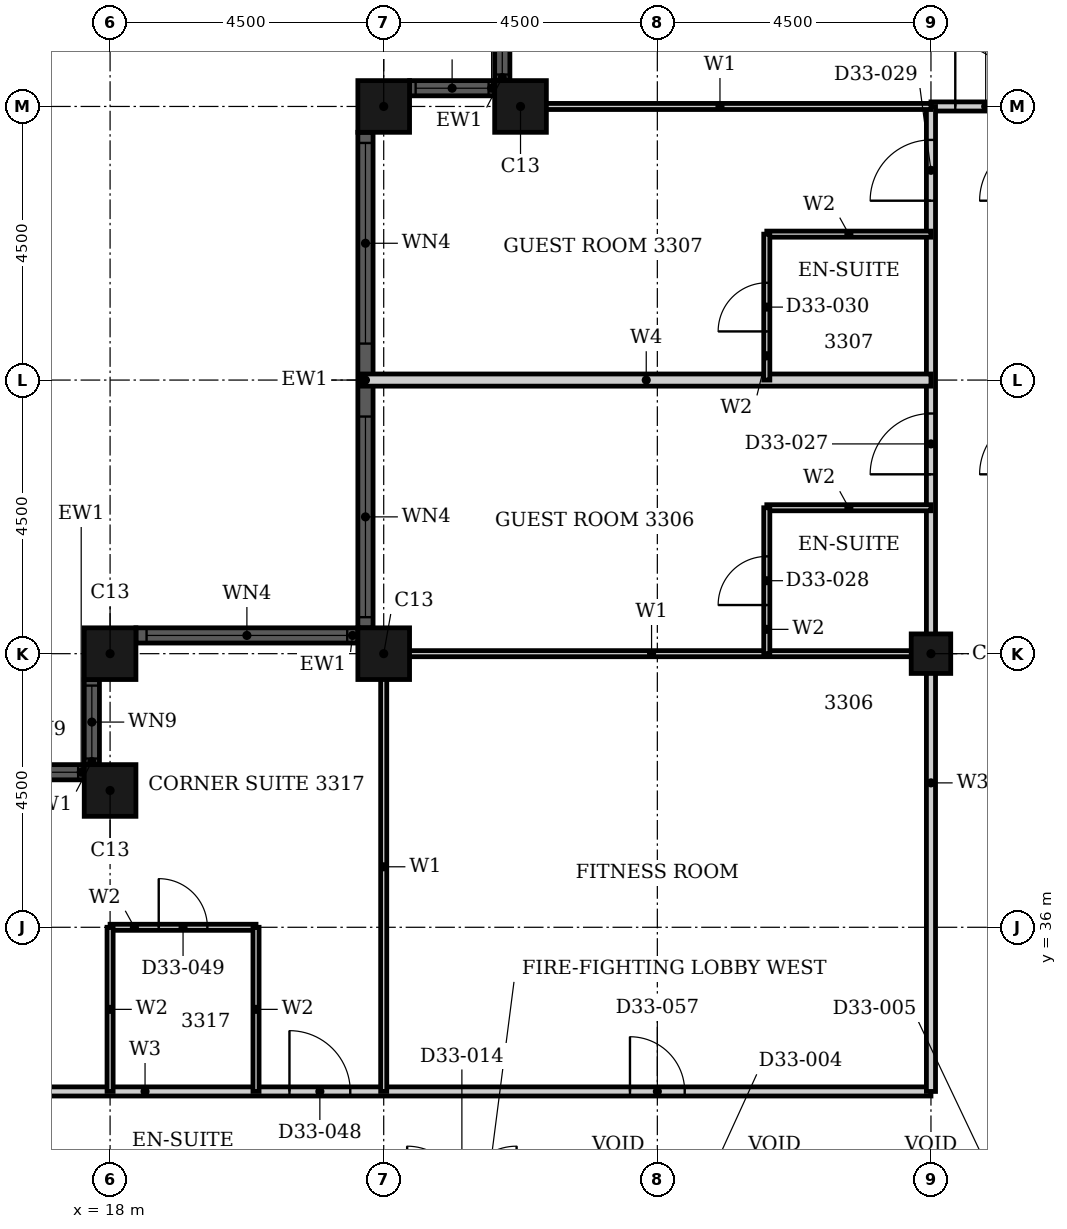
"""IFC4 building model, lengths in metres.
Left out: names, types, materials, properties, quantities, classifications, styles, units other than length and angle.
Written with IfcOpenShell. Run it as: python <this file> out.ifc"""

import sys

from ifc_helpers import new_model, si_unit, direction, frame, frame_2d, origin, origin_2d, place, context, subcontext, project, spatial, rectangle, hollow_rectangle, extrude, element, fill, save


model = new_model("IFC4")
c1 = context("Model", 3, precision=1e-05, world=origin(), true_north=direction((0.0, 1.0)))
c2 = subcontext(c1, "Body", "Model", "MODEL_VIEW")
j1 = project(units=[si_unit("LENGTHUNIT", "METRE"), si_unit("PLANEANGLEUNIT", "RADIAN")], contexts=[c1])
p1 = place(None, origin())
s1 = spatial("IfcSite", under=j1, at=p1, CompositionType="ELEMENT")
p2 = place(p1, origin())
s2 = spatial("IfcBuilding", under=s1, at=p2, CompositionType="ELEMENT")
p3 = place(p2, frame((0.0, 0.0, 133.2)))
s3 = spatial("IfcBuildingStorey", under=s2, at=p3, CompositionType="ELEMENT", Elevation=133.2)
for number, where, z_axis, x_axis in (
    (1, (24.75, 49.5, 0.0), (0.0, 0.0, 1.0), (1.0, 0.0, 0.0)),
    (2, (22.5, 49.5, 0.0), (0.0, 0.0, 1.0), (1.0, 0.0, 0.0)),
    (3, (22.5, 40.5, 0.0), (0.0, 0.0, 1.0), (1.0, 0.0, 0.0)),
    (4, (18.0, 40.5, 0.0), (0.0, 0.0, 1.0), (1.0, 0.0, 0.0)),
    (5, (18.0, 38.25, 0.0), (0.0, 0.0, 1.0), (1.0, 0.0, 0.0)),
):
    element("IfcColumn", number, at=place(p3, frame(where, z_axis=z_axis, x_axis=x_axis)), inside=s3, PredefinedType="COLUMN", context=c2, shape_type="SweptSolid", body=[
        extrude(hollow_rectangle(XDim=0.85, YDim=0.85, WallThickness=0.026, at=origin_2d()), origin(), (0.0, 0.0, 1.0), 3.6),
    ])
p4 = place(p3, frame((31.5, 40.5, 0.0), z_axis=(0.0, 0.0, 1.0), x_axis=(1.0, 0.0, 0.0)))
e6 = element("IfcColumn", 6, at=p4, inside=s3, PredefinedType="COLUMN", context=c2, shape_type="SweptSolid", body=[
    extrude(hollow_rectangle(XDim=0.65, YDim=0.65, WallThickness=0.021, at=origin_2d()), origin(), (0.0, 0.0, 1.0), 3.6),
])
p5 = place(p3, frame((24.45, 51.325, 0.0), z_axis=(0.0, 0.0, 1.0), x_axis=(0.0, -1.0, 0.0)))
e7 = element("IfcWall", 7, at=p5, inside=s3, PredefinedType="SOLIDWALL", context=c2, shape_type="SweptSolid", body=[
    extrude(rectangle(XDim=1.4, YDim=0.25, at=frame_2d((0.7, 0.0))), origin(), (0.0, 0.0, 1.0), 3.6),
])
p6 = place(p5, frame((0.1, 0.0, 0.9)))
e8 = element("IfcOpeningElement", 8, at=p6, cuts=e7, PredefinedType="OPENING", context=c2, shape_type="SweptSolid", body=[
    extrude(rectangle(XDim=1.2, YDim=2.08, at=frame_2d((0.6, 1.04))), frame((0.0, 0.135, 0.0), z_axis=(0.0, -1.0, 0.0), x_axis=(1.0, 0.0, 0.0)), (0.0, 0.0, 1.0), 0.27),
])
p7 = place(p3, frame((24.325, 49.8, 0.0), z_axis=(0.0, 0.0, 1.0), x_axis=(-1.0, 0.0, 0.0)))
e9 = element("IfcWall", 9, at=p7, inside=s3, PredefinedType="SOLIDWALL", context=c2, shape_type="SweptSolid", body=[
    extrude(rectangle(XDim=1.4, YDim=0.25, at=frame_2d((0.7, 0.0))), origin(), (0.0, 0.0, 1.0), 3.6),
])
p8 = place(p7, frame((0.1, 0.0, 0.9)))
e10 = element("IfcOpeningElement", 10, at=p8, cuts=e9, PredefinedType="OPENING", context=c2, shape_type="SweptSolid", body=[
    extrude(rectangle(XDim=1.2, YDim=2.08, at=frame_2d((0.6, 1.04))), frame((0.0, 0.135, 0.0), z_axis=(0.0, -1.0, 0.0), x_axis=(1.0, 0.0, 0.0)), (0.0, 0.0, 1.0), 0.27),
])
p9 = place(p3, frame((22.2, 49.075, 0.0), z_axis=(0.0, 0.0, 1.0), x_axis=(0.0, -1.0, 0.0)))
e11 = element("IfcWall", 11, at=p9, inside=s3, PredefinedType="SOLIDWALL", context=c2, shape_type="SweptSolid", body=[
    extrude(rectangle(XDim=8.15, YDim=0.25, at=frame_2d((4.075, 0.0))), origin(), (0.0, 0.0, 1.0), 3.6),
])
p10 = place(p9, frame((0.175, 0.0, 0.9)))
e12 = element("IfcOpeningElement", 12, at=p10, cuts=e11, PredefinedType="OPENING", context=c2, shape_type="SweptSolid", body=[
    extrude(rectangle(XDim=3.3, YDim=2.08, at=frame_2d((1.65, 1.04))), frame((0.0, 0.135, 0.0), z_axis=(0.0, -1.0, 0.0), x_axis=(1.0, 0.0, 0.0)), (0.0, 0.0, 1.0), 0.27),
])
p11 = place(p9, frame((4.675, 0.0, 0.9)))
e13 = element("IfcOpeningElement", 13, at=p11, cuts=e11, PredefinedType="OPENING", context=c2, shape_type="SweptSolid", body=[
    extrude(rectangle(XDim=3.3, YDim=2.08, at=frame_2d((1.65, 1.04))), frame((0.0, 0.135, 0.0), z_axis=(0.0, -1.0, 0.0), x_axis=(1.0, 0.0, 0.0)), (0.0, 0.0, 1.0), 0.27),
])
p12 = place(p3, frame((22.075, 40.8, 0.0), z_axis=(0.0, 0.0, 1.0), x_axis=(-1.0, 0.0, 0.0)))
e14 = element("IfcWall", 14, at=p12, inside=s3, PredefinedType="SOLIDWALL", context=c2, shape_type="SweptSolid", body=[
    extrude(rectangle(XDim=3.65, YDim=0.25, at=frame_2d((1.825, 0.0))), origin(), (0.0, 0.0, 1.0), 3.6),
])
p13 = place(p12, frame((0.175, 0.0, 0.9)))
e15 = element("IfcOpeningElement", 15, at=p13, cuts=e14, PredefinedType="OPENING", context=c2, shape_type="SweptSolid", body=[
    extrude(rectangle(XDim=3.3, YDim=2.08, at=frame_2d((1.65, 1.04))), frame((0.0, 0.135, 0.0), z_axis=(0.0, -1.0, 0.0), x_axis=(1.0, 0.0, 0.0)), (0.0, 0.0, 1.0), 0.27),
])
p14 = place(p3, frame((17.7, 40.075, 0.0), z_axis=(0.0, 0.0, 1.0), x_axis=(0.0, -1.0, 0.0)))
e16 = element("IfcWall", 16, at=p14, inside=s3, PredefinedType="SOLIDWALL", context=c2, shape_type="SweptSolid", body=[
    extrude(rectangle(XDim=1.4, YDim=0.25, at=frame_2d((0.7, 0.0))), origin(), (0.0, 0.0, 1.0), 3.6),
])
p15 = place(p14, frame((0.1, 0.0, 0.9)))
e17 = element("IfcOpeningElement", 17, at=p15, cuts=e16, PredefinedType="OPENING", context=c2, shape_type="SweptSolid", body=[
    extrude(rectangle(XDim=1.2, YDim=2.08, at=frame_2d((0.6, 1.04))), frame((0.0, 0.135, 0.0), z_axis=(0.0, -1.0, 0.0), x_axis=(1.0, 0.0, 0.0)), (0.0, 0.0, 1.0), 0.27),
])
p16 = place(p3, frame((17.575, 38.55, 0.0), z_axis=(0.0, 0.0, 1.0), x_axis=(-1.0, 0.0, 0.0)))
e18 = element("IfcWall", 18, at=p16, inside=s3, PredefinedType="SOLIDWALL", context=c2, shape_type="SweptSolid", body=[
    extrude(rectangle(XDim=1.4, YDim=0.25, at=frame_2d((0.7, 0.0))), origin(), (0.0, 0.0, 1.0), 3.6),
])
p17 = place(p16, frame((0.1, 0.0, 0.9)))
e19 = element("IfcOpeningElement", 19, at=p17, cuts=e18, PredefinedType="OPENING", context=c2, shape_type="SweptSolid", body=[
    extrude(rectangle(XDim=1.2, YDim=2.08, at=frame_2d((0.6, 1.04))), frame((0.0, 0.135, 0.0), z_axis=(0.0, -1.0, 0.0), x_axis=(1.0, 0.0, 0.0)), (0.0, 0.0, 1.0), 0.27),
])
p18 = place(p3, frame((16.2, 33.3, 0.0), z_axis=(0.0, 0.0, 1.0), x_axis=(1.0, 0.0, 0.0)))
e20 = element("IfcWall", 20, at=p18, inside=s3, PredefinedType="PARTITIONING", context=c2, shape_type="SweptSolid", body=[
    extrude(rectangle(XDim=15.3, YDim=0.15, at=frame_2d((7.65, 0.0))), origin(), (0.0, 0.0, 1.0), 3.3),
])
p19 = place(p18, frame((4.75, 0.0, 0.0)))
e21 = element("IfcOpeningElement", 21, at=p19, cuts=e20, PredefinedType="OPENING", context=c2, shape_type="SweptSolid", body=[
    extrude(rectangle(XDim=1.0, YDim=2.1, at=frame_2d((0.5, 1.05))), frame((0.0, 0.085, 0.0), z_axis=(0.0, -1.0, 0.0), x_axis=(1.0, 0.0, 0.0)), (0.0, 0.0, 1.0), 0.17),
])
p20 = place(p18, frame((10.35, 0.0, 0.0)))
e22 = element("IfcOpeningElement", 22, at=p20, cuts=e20, PredefinedType="OPENING", context=c2, shape_type="SweptSolid", body=[
    extrude(rectangle(XDim=0.9, YDim=2.1, at=frame_2d((0.45, 1.05))), frame((0.0, 0.085, 0.0), z_axis=(0.0, -1.0, 0.0), x_axis=(1.0, 0.0, 0.0)), (0.0, 0.0, 1.0), 0.17),
])
p21 = place(p3, frame((31.5, 49.5, 0.0), z_axis=(0.0, 0.0, 1.0), x_axis=(1.0, 0.0, 0.0)))
e23 = element("IfcWall", 23, at=p21, inside=s3, PredefinedType="PARTITIONING", context=c2, shape_type="SweptSolid", body=[
    extrude(rectangle(XDim=1.8, YDim=0.15, at=frame_2d((0.9, 0.0))), origin(), (0.0, 0.0, 1.0), 3.3),
])
p22 = place(p21, frame((0.4, 0.0, 0.0)))
e24 = element("IfcOpeningElement", 24, at=p22, cuts=e23, PredefinedType="OPENING", context=c2, shape_type="SweptSolid", body=[
    extrude(rectangle(XDim=1.0, YDim=2.1, at=frame_2d((0.5, 1.05))), frame((0.0, 0.085, 0.0), z_axis=(0.0, -1.0, 0.0), x_axis=(1.0, 0.0, 0.0)), (0.0, 0.0, 1.0), 0.17),
])
p23 = place(p3, frame((31.5, 33.3, 0.0), z_axis=(0.0, 0.0, 1.0), x_axis=(0.0, 1.0, 0.0)))
e25 = element("IfcWall", 25, at=p23, inside=s3, PredefinedType="PARTITIONING", context=c2, shape_type="SweptSolid", body=[
    extrude(rectangle(XDim=16.2, YDim=0.15, at=frame_2d((8.1, 0.0))), origin(), (0.0, 0.0, 1.0), 2.58),
])
p24 = place(p23, frame((10.15, 0.0, 0.0)))
e26 = element("IfcOpeningElement", 26, at=p24, cuts=e25, PredefinedType="OPENING", context=c2, shape_type="SweptSolid", body=[
    extrude(rectangle(XDim=1.0, YDim=2.1, at=frame_2d((0.5, 1.05))), frame((0.0, 0.085, 0.0), z_axis=(0.0, -1.0, 0.0), x_axis=(1.0, 0.0, 0.0)), (0.0, 0.0, 1.0), 0.17),
])
p25 = place(p23, frame((14.65, 0.0, 0.0)))
e27 = element("IfcOpeningElement", 27, at=p25, cuts=e25, PredefinedType="OPENING", context=c2, shape_type="SweptSolid", body=[
    extrude(rectangle(XDim=1.0, YDim=2.1, at=frame_2d((0.5, 1.05))), frame((0.0, 0.085, 0.0), z_axis=(0.0, -1.0, 0.0), x_axis=(1.0, 0.0, 0.0)), (0.0, 0.0, 1.0), 0.17),
])
p26 = place(p3, frame((22.31, 40.5, 0.0), z_axis=(0.0, 0.0, 1.0), x_axis=(1.0, 0.0, 0.0)))
e28 = element("IfcWall", 28, at=p26, inside=s3, PredefinedType="PARTITIONING", context=c2, shape_type="SweptSolid", body=[
    extrude(rectangle(XDim=9.19, YDim=0.1, at=frame_2d((4.595, 0.0))), origin(), (0.0, 0.0, 1.0), 2.38),
])
p27 = place(p3, frame((24.56, 49.5, 0.0), z_axis=(0.0, 0.0, 1.0), x_axis=(1.0, 0.0, 0.0)))
e29 = element("IfcWall", 29, at=p27, inside=s3, PredefinedType="PARTITIONING", context=c2, shape_type="SweptSolid", body=[
    extrude(rectangle(XDim=6.94, YDim=0.1, at=frame_2d((3.47, 0.0))), origin(), (0.0, 0.0, 1.0), 3.3),
])
p28 = place(p3, frame((22.5, 33.3, 0.0), z_axis=(0.0, 0.0, 1.0), x_axis=(0.0, 1.0, 0.0)))
e30 = element("IfcWall", 30, at=p28, inside=s3, PredefinedType="PARTITIONING", context=c2, shape_type="SweptSolid", body=[
    extrude(rectangle(XDim=7.39, YDim=0.1, at=frame_2d((3.695, 0.0))), origin(), (0.0, 0.0, 1.0), 3.3),
])
p29 = place(p3, frame((22.135, 45.0, 0.0), z_axis=(0.0, 0.0, 1.0), x_axis=(1.0, 0.0, 0.0)))
e31 = element("IfcWall", 31, at=p29, inside=s3, PredefinedType="PARTITIONING", context=c2, shape_type="SweptSolid", body=[
    extrude(rectangle(XDim=9.365, YDim=0.2, at=frame_2d((4.683, 0.0))), origin(), (0.0, 0.0, 1.0), 3.3),
])
p30 = place(p3, frame((18.0, 36.0, 0.0), z_axis=(0.0, 0.0, 1.0), x_axis=(1.0, 0.0, 0.0)))
e32 = element("IfcWall", 32, at=p30, inside=s3, PredefinedType="PARTITIONING", context=c2, shape_type="SweptSolid", body=[
    extrude(rectangle(XDim=2.4, YDim=0.1, at=frame_2d((1.2, 0.0))), origin(), (0.0, 0.0, 1.0), 3.3),
])
p31 = place(p30, frame((0.8, 0.0, 0.0)))
e33 = element("IfcOpeningElement", 33, at=p31, cuts=e32, PredefinedType="OPENING", context=c2, shape_type="SweptSolid", body=[
    extrude(rectangle(XDim=0.8, YDim=2.1, at=frame_2d((0.4, 1.05))), frame((0.0, 0.06, 0.0), z_axis=(0.0, -1.0, 0.0), x_axis=(1.0, 0.0, 0.0)), (0.0, 0.0, 1.0), 0.12),
])
for number, where, z_axis, x_axis in (
    (34, (28.8, 42.9, 0.0), (0.0, 0.0, 1.0), (1.0, 0.0, 0.0)),
    (35, (28.8, 47.4, 0.0), (0.0, 0.0, 1.0), (1.0, 0.0, 0.0)),
    (36, (18.0, 33.3, 0.0), (0.0, 0.0, 1.0), (0.0, 1.0, 0.0)),
    (37, (20.4, 33.3, 0.0), (0.0, 0.0, 1.0), (0.0, 1.0, 0.0)),
):
    element("IfcWall", number, at=place(p3, frame(where, z_axis=z_axis, x_axis=x_axis)), inside=s3, PredefinedType="PARTITIONING", context=c2, shape_type="SweptSolid", body=[
        extrude(rectangle(XDim=2.7, YDim=0.1, at=frame_2d((1.35, 0.0))), origin(), (0.0, 0.0, 1.0), 3.3),
    ])
p32 = place(p3, frame((28.8, 40.5, 0.0), z_axis=(0.0, 0.0, 1.0), x_axis=(0.0, 1.0, 0.0)))
e38 = element("IfcWall", 38, at=p32, inside=s3, PredefinedType="PARTITIONING", context=c2, shape_type="SweptSolid", body=[
    extrude(rectangle(XDim=2.4, YDim=0.1, at=frame_2d((1.2, 0.0))), origin(), (0.0, 0.0, 1.0), 3.3),
])
p33 = place(p32, frame((0.8, 0.0, 0.0)))
e39 = element("IfcOpeningElement", 39, at=p33, cuts=e38, PredefinedType="OPENING", context=c2, shape_type="SweptSolid", body=[
    extrude(rectangle(XDim=0.8, YDim=2.1, at=frame_2d((0.4, 1.05))), frame((0.0, 0.06, 0.0), z_axis=(0.0, -1.0, 0.0), x_axis=(1.0, 0.0, 0.0)), (0.0, 0.0, 1.0), 0.12),
])
p34 = place(p3, frame((28.8, 45.0, 0.0), z_axis=(0.0, 0.0, 1.0), x_axis=(0.0, 1.0, 0.0)))
e40 = element("IfcWall", 40, at=p34, inside=s3, PredefinedType="PARTITIONING", context=c2, shape_type="SweptSolid", body=[
    extrude(rectangle(XDim=2.4, YDim=0.1, at=frame_2d((1.2, 0.0))), origin(), (0.0, 0.0, 1.0), 3.3),
])
p35 = place(p34, frame((0.8, 0.0, 0.0)))
e41 = element("IfcOpeningElement", 41, at=p35, cuts=e40, PredefinedType="OPENING", context=c2, shape_type="SweptSolid", body=[
    extrude(rectangle(XDim=0.8, YDim=2.1, at=frame_2d((0.4, 1.05))), frame((0.0, 0.06, 0.0), z_axis=(0.0, -1.0, 0.0), x_axis=(1.0, 0.0, 0.0)), (0.0, 0.0, 1.0), 0.12),
])
p36 = place(p6, origin())
e42 = element("IfcWindow", 42, at=p36, inside=s3, PartitioningType="SINGLE_PANEL", PredefinedType="WINDOW", context=c2, shape_type="SweptSolid", body=[
    extrude(rectangle(XDim=1.2, YDim=2.08, at=frame_2d((0.6, 1.04))), frame((0.0, 0.03, 0.0), z_axis=(0.0, -1.0, 0.0), x_axis=(1.0, 0.0, 0.0)), (0.0, 0.0, 1.0), 0.06),
])
fill(e8, e42)
p37 = place(p8, origin())
e43 = element("IfcWindow", 43, at=p37, inside=s3, PartitioningType="SINGLE_PANEL", PredefinedType="WINDOW", context=c2, shape_type="SweptSolid", body=[
    extrude(rectangle(XDim=1.2, YDim=2.08, at=frame_2d((0.6, 1.04))), frame((0.0, 0.03, 0.0), z_axis=(0.0, -1.0, 0.0), x_axis=(1.0, 0.0, 0.0)), (0.0, 0.0, 1.0), 0.06),
])
fill(e10, e43)
p38 = place(p10, origin())
e44 = element("IfcWindow", 44, at=p38, inside=s3, PartitioningType="SINGLE_PANEL", PredefinedType="WINDOW", context=c2, shape_type="SweptSolid", body=[
    extrude(rectangle(XDim=3.3, YDim=2.08, at=frame_2d((1.65, 1.04))), frame((0.0, 0.03, 0.0), z_axis=(0.0, -1.0, 0.0), x_axis=(1.0, 0.0, 0.0)), (0.0, 0.0, 1.0), 0.06),
])
fill(e12, e44)
p39 = place(p11, origin())
e45 = element("IfcWindow", 45, at=p39, inside=s3, PartitioningType="SINGLE_PANEL", PredefinedType="WINDOW", context=c2, shape_type="SweptSolid", body=[
    extrude(rectangle(XDim=3.3, YDim=2.08, at=frame_2d((1.65, 1.04))), frame((0.0, 0.03, 0.0), z_axis=(0.0, -1.0, 0.0), x_axis=(1.0, 0.0, 0.0)), (0.0, 0.0, 1.0), 0.06),
])
fill(e13, e45)
p40 = place(p13, origin())
e46 = element("IfcWindow", 46, at=p40, inside=s3, PartitioningType="SINGLE_PANEL", PredefinedType="WINDOW", context=c2, shape_type="SweptSolid", body=[
    extrude(rectangle(XDim=3.3, YDim=2.08, at=frame_2d((1.65, 1.04))), frame((0.0, 0.03, 0.0), z_axis=(0.0, -1.0, 0.0), x_axis=(1.0, 0.0, 0.0)), (0.0, 0.0, 1.0), 0.06),
])
fill(e15, e46)
p41 = place(p15, origin())
e47 = element("IfcWindow", 47, at=p41, inside=s3, PartitioningType="SINGLE_PANEL", PredefinedType="WINDOW", context=c2, shape_type="SweptSolid", body=[
    extrude(rectangle(XDim=1.2, YDim=2.08, at=frame_2d((0.6, 1.04))), frame((0.0, 0.03, 0.0), z_axis=(0.0, -1.0, 0.0), x_axis=(1.0, 0.0, 0.0)), (0.0, 0.0, 1.0), 0.06),
])
fill(e17, e47)
p42 = place(p17, origin())
e48 = element("IfcWindow", 48, at=p42, inside=s3, PartitioningType="SINGLE_PANEL", PredefinedType="WINDOW", context=c2, shape_type="SweptSolid", body=[
    extrude(rectangle(XDim=1.2, YDim=2.08, at=frame_2d((0.6, 1.04))), frame((0.0, 0.03, 0.0), z_axis=(0.0, -1.0, 0.0), x_axis=(1.0, 0.0, 0.0)), (0.0, 0.0, 1.0), 0.06),
])
fill(e19, e48)
p43 = place(p24, origin())
e49 = element("IfcDoor", 49, at=p43, inside=s3, OperationType="SINGLE_SWING_RIGHT", PredefinedType="DOOR", context=c2, shape_type="SweptSolid", body=[
    extrude(rectangle(XDim=1.0, YDim=2.1, at=frame_2d((0.5, 1.05))), frame((0.0, 0.025, 0.0), z_axis=(0.0, -1.0, 0.0), x_axis=(1.0, 0.0, 0.0)), (0.0, 0.0, 1.0), 0.05),
])
fill(e26, e49)
p44 = place(p33, origin())
e50 = element("IfcDoor", 50, at=p44, inside=s3, OperationType="SINGLE_SWING_RIGHT", PredefinedType="DOOR", context=c2, shape_type="SweptSolid", body=[
    extrude(rectangle(XDim=0.8, YDim=2.1, at=frame_2d((0.4, 1.05))), frame((0.0, 0.025, 0.0), z_axis=(0.0, -1.0, 0.0), x_axis=(1.0, 0.0, 0.0)), (0.0, 0.0, 1.0), 0.05),
])
fill(e39, e50)
p45 = place(p25, origin())
e51 = element("IfcDoor", 51, at=p45, inside=s3, OperationType="SINGLE_SWING_RIGHT", PredefinedType="DOOR", context=c2, shape_type="SweptSolid", body=[
    extrude(rectangle(XDim=1.0, YDim=2.1, at=frame_2d((0.5, 1.05))), frame((0.0, 0.025, 0.0), z_axis=(0.0, -1.0, 0.0), x_axis=(1.0, 0.0, 0.0)), (0.0, 0.0, 1.0), 0.05),
])
fill(e27, e51)
p46 = place(p35, origin())
e52 = element("IfcDoor", 52, at=p46, inside=s3, OperationType="SINGLE_SWING_RIGHT", PredefinedType="DOOR", context=c2, shape_type="SweptSolid", body=[
    extrude(rectangle(XDim=0.8, YDim=2.1, at=frame_2d((0.4, 1.05))), frame((0.0, 0.025, 0.0), z_axis=(0.0, -1.0, 0.0), x_axis=(1.0, 0.0, 0.0)), (0.0, 0.0, 1.0), 0.05),
])
fill(e41, e52)
p47 = place(p22, origin())
e53 = element("IfcDoor", 53, at=p47, inside=s3, OperationType="SINGLE_SWING_LEFT", PredefinedType="DOOR", context=c2, shape_type="SweptSolid", body=[
    extrude(rectangle(XDim=1.0, YDim=2.1, at=frame_2d((0.5, 1.05))), frame((0.0, 0.025, 0.0), z_axis=(0.0, -1.0, 0.0), x_axis=(1.0, 0.0, 0.0)), (0.0, 0.0, 1.0), 0.05),
])
fill(e24, e53)
p48 = place(p19, origin())
e54 = element("IfcDoor", 54, at=p48, inside=s3, OperationType="SINGLE_SWING_RIGHT", PredefinedType="DOOR", context=c2, shape_type="SweptSolid", body=[
    extrude(rectangle(XDim=1.0, YDim=2.1, at=frame_2d((0.5, 1.05))), frame((0.0, 0.025, 0.0), z_axis=(0.0, -1.0, 0.0), x_axis=(1.0, 0.0, 0.0)), (0.0, 0.0, 1.0), 0.05),
])
fill(e21, e54)
p49 = place(p31, origin())
e55 = element("IfcDoor", 55, at=p49, inside=s3, OperationType="SINGLE_SWING_RIGHT", PredefinedType="DOOR", context=c2, shape_type="SweptSolid", body=[
    extrude(rectangle(XDim=0.8, YDim=2.1, at=frame_2d((0.4, 1.05))), frame((0.0, 0.025, 0.0), z_axis=(0.0, -1.0, 0.0), x_axis=(1.0, 0.0, 0.0)), (0.0, 0.0, 1.0), 0.05),
])
fill(e33, e55)
p50 = place(p20, origin())
e56 = element("IfcDoor", 56, at=p50, inside=s3, OperationType="SINGLE_SWING_LEFT", PredefinedType="DOOR", context=c2, shape_type="SweptSolid", body=[
    extrude(rectangle(XDim=0.9, YDim=2.1, at=frame_2d((0.45, 1.05))), frame((0.0, 0.025, 0.0), z_axis=(0.0, -1.0, 0.0), x_axis=(1.0, 0.0, 0.0)), (0.0, 0.0, 1.0), 0.05),
])
fill(e22, e56)
save(model, sys.argv[1])
